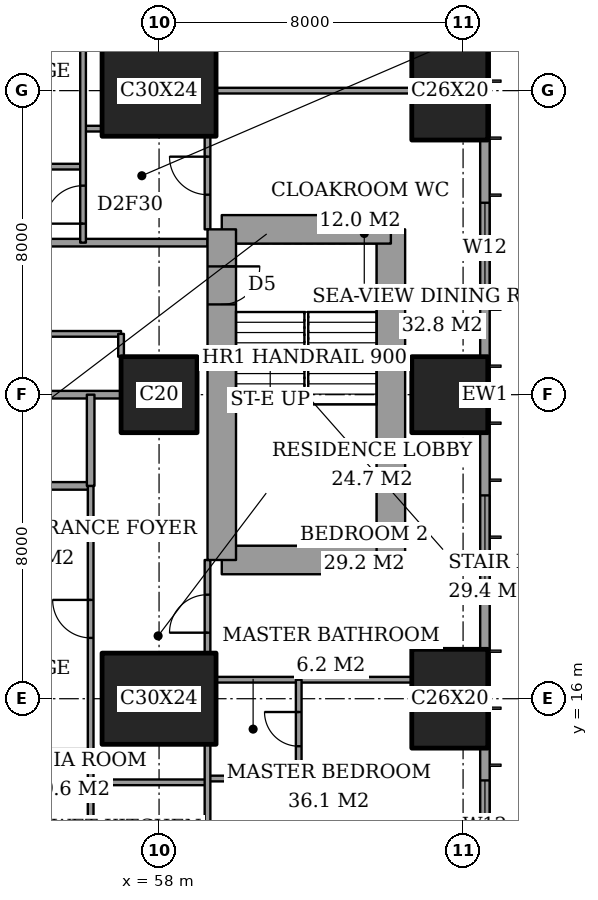
"""IFC4 building model, lengths in metres.
Left out: names, types, materials, properties, quantities, classifications, styles, units other than length and angle.
Written with IfcOpenShell. Run it as: python <this file> out.ifc"""

import sys

from ifc_helpers import new_model, si_unit, direction, frame, frame_2d, origin, origin_2d, place, context, subcontext, project, spatial, rectangle, extrude, element, fill, save


model = new_model("IFC4")
c1 = context("Model", 3, precision=1e-05, world=origin(), true_north=direction((0.0, 1.0)))
c2 = subcontext(c1, "Body", "Model", "MODEL_VIEW")
j1 = project(units=[si_unit("LENGTHUNIT", "METRE"), si_unit("PLANEANGLEUNIT", "RADIAN")], contexts=[c1])
p1 = place(None, origin())
s1 = spatial("IfcSite", under=j1, at=p1, CompositionType="ELEMENT")
p2 = place(p1, origin())
s2 = spatial("IfcBuilding", under=s1, at=p2, CompositionType="ELEMENT")
p3 = place(p2, frame((0.0, 0.0, 110.6)))
s3 = spatial("IfcBuildingStorey", under=s2, at=p3, CompositionType="ELEMENT", Elevation=110.6)
p4 = place(p3, frame((58.0, 16.0, 0.0), z_axis=(0.0, 0.0, 1.0), x_axis=(1.0, 0.0, 0.0)))
e1 = element("IfcColumn", 1, at=p4, inside=s3, PredefinedType="COLUMN", context=c2, shape_type="SweptSolid", body=[
    extrude(rectangle(XDim=3.0, YDim=2.4, at=origin_2d()), origin(), (0.0, 0.0, 1.0), 3.6),
])
p5 = place(p3, frame((58.0, 24.0, 0.0), z_axis=(0.0, 0.0, 1.0), x_axis=(1.0, 0.0, 0.0)))
e2 = element("IfcColumn", 2, at=p5, inside=s3, PredefinedType="COLUMN", context=c2, shape_type="SweptSolid", body=[
    extrude(rectangle(XDim=2.0, YDim=2.0, at=origin_2d()), origin(), (0.0, 0.0, 1.0), 3.6),
])
p6 = place(p3, frame((58.0, 32.0, 0.0), z_axis=(0.0, 0.0, 1.0), x_axis=(1.0, 0.0, 0.0)))
e3 = element("IfcColumn", 3, at=p6, inside=s3, PredefinedType="COLUMN", context=c2, shape_type="SweptSolid", body=[
    extrude(rectangle(XDim=3.0, YDim=2.4, at=origin_2d()), origin(), (0.0, 0.0, 1.0), 3.6),
])
p7 = place(p3, frame((65.65, 16.0, 0.0), z_axis=(0.0, 0.0, 1.0), x_axis=(0.0, 1.0, 0.0)))
e4 = element("IfcColumn", 4, at=p7, inside=s3, PredefinedType="COLUMN", context=c2, shape_type="SweptSolid", body=[
    extrude(rectangle(XDim=2.6, YDim=2.0, at=origin_2d()), origin(), (0.0, 0.0, 1.0), 3.6),
])
p8 = place(p3, frame((65.65, 24.0, 0.0), z_axis=(0.0, 0.0, 1.0), x_axis=(1.0, 0.0, 0.0)))
e5 = element("IfcColumn", 5, at=p8, inside=s3, PredefinedType="COLUMN", context=c2, shape_type="SweptSolid", body=[
    extrude(rectangle(XDim=2.0, YDim=2.0, at=origin_2d()), origin(), (0.0, 0.0, 1.0), 3.6),
])
p9 = place(p3, frame((65.65, 32.0, 0.0), z_axis=(0.0, 0.0, 1.0), x_axis=(0.0, 1.0, 0.0)))
e6 = element("IfcColumn", 6, at=p9, inside=s3, PredefinedType="COLUMN", context=c2, shape_type="SweptSolid", body=[
    extrude(rectangle(XDim=2.6, YDim=2.0, at=origin_2d()), origin(), (0.0, 0.0, 1.0), 3.6),
])
p10 = place(p3, frame((59.65, 19.65, 0.0), z_axis=(0.0, 0.0, 1.0), x_axis=(1.0, 0.0, 0.0)))
e7 = element("IfcWall", 7, at=p10, inside=s3, PredefinedType="SHEAR", context=c2, shape_type="SweptSolid", body=[
    extrude(rectangle(XDim=4.45, YDim=0.75, at=frame_2d((2.225, 0.0))), origin(), (0.0, 0.0, 1.0), 3.6),
])
p11 = place(p3, frame((64.1, 19.65, 0.0), z_axis=(0.0, 0.0, 1.0), x_axis=(0.0, 1.0, 0.0)))
e8 = element("IfcWall", 8, at=p11, inside=s3, PredefinedType="SHEAR", context=c2, shape_type="SweptSolid", body=[
    extrude(rectangle(XDim=8.7, YDim=0.75, at=frame_2d((4.35, 0.0))), origin(), (0.0, 0.0, 1.0), 3.6),
])
p12 = place(p3, frame((64.1, 28.35, 0.0), z_axis=(0.0, 0.0, 1.0), x_axis=(-1.0, 0.0, 0.0)))
e9 = element("IfcWall", 9, at=p12, inside=s3, PredefinedType="SHEAR", context=c2, shape_type="SweptSolid", body=[
    extrude(rectangle(XDim=4.45, YDim=0.75, at=frame_2d((2.225, 0.0))), origin(), (0.0, 0.0, 1.0), 3.6),
])
p13 = place(p3, frame((59.65, 28.35, 0.0), z_axis=(0.0, 0.0, 1.0), x_axis=(0.0, -1.0, 0.0)))
e10 = element("IfcWall", 10, at=p13, inside=s3, PredefinedType="SHEAR", context=c2, shape_type="SweptSolid", body=[
    extrude(rectangle(XDim=8.7, YDim=0.75, at=frame_2d((4.35, 0.0))), origin(), (0.0, 0.0, 1.0), 3.6),
])
p14 = place(p13, frame((0.975, 0.0, 0.0)))
e11 = element("IfcOpeningElement", 11, at=p14, cuts=e10, PredefinedType="OPENING", context=c2, shape_type="SweptSolid", body=[
    extrude(rectangle(XDim=1.0, YDim=2.1, at=frame_2d((0.5, 1.05))), frame((0.0, 0.385, 0.0), z_axis=(0.0, -1.0, 0.0), x_axis=(1.0, 0.0, 0.0)), (0.0, 0.0, 1.0), 0.77),
])
p15 = place(p3, frame((66.575, 3.175, 0.0), z_axis=(0.0, 0.0, 1.0), x_axis=(0.0, 1.0, 0.0)))
e12 = element("IfcWall", 12, at=p15, inside=s3, PredefinedType="SOLIDWALL", context=c2, shape_type="SweptSolid", body=[
    extrude(rectangle(XDim=41.65, YDim=0.25, at=frame_2d((20.825, 0.0))), origin(), (0.0, 0.0, 1.0), 3.6),
])
p16 = place(p15, frame((0.775, 0.0, 0.4)))
e13 = element("IfcOpeningElement", 13, at=p16, cuts=e12, PredefinedType="OPENING", context=c2, shape_type="SweptSolid", body=[
    extrude(rectangle(XDim=2.4, YDim=2.2, at=frame_2d((1.2, 1.1))), frame((0.0, 0.135, 0.0), z_axis=(0.0, -1.0, 0.0), x_axis=(1.0, 0.0, 0.0)), (0.0, 0.0, 1.0), 0.27),
])
p17 = place(p15, frame((6.1, 0.0, 0.4)))
e14 = element("IfcOpeningElement", 14, at=p17, cuts=e12, PredefinedType="OPENING", context=c2, shape_type="SweptSolid", body=[
    extrude(rectangle(XDim=1.2, YDim=2.2, at=frame_2d((0.6, 1.1))), frame((0.0, 0.135, 0.0), z_axis=(0.0, -1.0, 0.0), x_axis=(1.0, 0.0, 0.0)), (0.0, 0.0, 1.0), 0.27),
])
p18 = place(p15, frame((8.275, 0.0, 0.4)))
e15 = element("IfcOpeningElement", 15, at=p18, cuts=e12, PredefinedType="OPENING", context=c2, shape_type="SweptSolid", body=[
    extrude(rectangle(XDim=2.4, YDim=2.2, at=frame_2d((1.2, 1.1))), frame((0.0, 0.135, 0.0), z_axis=(0.0, -1.0, 0.0), x_axis=(1.0, 0.0, 0.0)), (0.0, 0.0, 1.0), 0.27),
])
p19 = place(p15, frame((15.775, 0.0, 0.4)))
e16 = element("IfcOpeningElement", 16, at=p19, cuts=e12, PredefinedType="OPENING", context=c2, shape_type="SweptSolid", body=[
    extrude(rectangle(XDim=2.4, YDim=2.2, at=frame_2d((1.2, 1.1))), frame((0.0, 0.135, 0.0), z_axis=(0.0, -1.0, 0.0), x_axis=(1.0, 0.0, 0.0)), (0.0, 0.0, 1.0), 0.27),
])
p20 = place(p15, frame((23.475, 0.0, 0.4)))
e17 = element("IfcOpeningElement", 17, at=p20, cuts=e12, PredefinedType="OPENING", context=c2, shape_type="SweptSolid", body=[
    extrude(rectangle(XDim=2.4, YDim=2.2, at=frame_2d((1.2, 1.1))), frame((0.0, 0.135, 0.0), z_axis=(0.0, -1.0, 0.0), x_axis=(1.0, 0.0, 0.0)), (0.0, 0.0, 1.0), 0.27),
])
p21 = place(p15, frame((30.975, 0.0, 0.4)))
e18 = element("IfcOpeningElement", 18, at=p21, cuts=e12, PredefinedType="OPENING", context=c2, shape_type="SweptSolid", body=[
    extrude(rectangle(XDim=2.4, YDim=2.2, at=frame_2d((1.2, 1.1))), frame((0.0, 0.135, 0.0), z_axis=(0.0, -1.0, 0.0), x_axis=(1.0, 0.0, 0.0)), (0.0, 0.0, 1.0), 0.27),
])
p22 = place(p15, frame((34.5, 0.0, 0.4)))
e19 = element("IfcOpeningElement", 19, at=p22, cuts=e12, PredefinedType="OPENING", context=c2, shape_type="SweptSolid", body=[
    extrude(rectangle(XDim=1.2, YDim=2.2, at=frame_2d((0.6, 1.1))), frame((0.0, 0.135, 0.0), z_axis=(0.0, -1.0, 0.0), x_axis=(1.0, 0.0, 0.0)), (0.0, 0.0, 1.0), 0.27),
])
p23 = place(p15, frame((38.475, 0.0, 0.4)))
e20 = element("IfcOpeningElement", 20, at=p23, cuts=e12, PredefinedType="OPENING", context=c2, shape_type="SweptSolid", body=[
    extrude(rectangle(XDim=2.4, YDim=2.2, at=frame_2d((1.2, 1.1))), frame((0.0, 0.135, 0.0), z_axis=(0.0, -1.0, 0.0), x_axis=(1.0, 0.0, 0.0)), (0.0, 0.0, 1.0), 0.27),
])
p24 = place(p3, frame((56.2, 13.8, 0.0), z_axis=(0.0, 0.0, 1.0), x_axis=(1.0, 0.0, 0.0)))
e21 = element("IfcWall", 21, at=p24, inside=s3, PredefinedType="PARTITIONING", context=c2, shape_type="SweptSolid", body=[
    extrude(rectangle(XDim=3.075, YDim=0.15, at=frame_2d((1.538, 0.0))), origin(), (0.0, 0.0, 1.0), 3.35),
])
p25 = place(p3, frame((59.275, 13.9, 0.0), z_axis=(0.0, 0.0, 1.0), x_axis=(1.0, 0.0, 0.0)))
e22 = element("IfcWall", 22, at=p25, inside=s3, PredefinedType="PARTITIONING", context=c2, shape_type="SweptSolid", body=[
    extrude(rectangle(XDim=2.4, YDim=0.15, at=frame_2d((1.2, 0.0))), origin(), (0.0, 0.0, 1.0), 3.35),
])
p26 = place(p3, frame((48.0, 14.6, 0.0), z_axis=(0.0, 0.0, 1.0), x_axis=(1.0, 0.0, 0.0)))
e23 = element("IfcWall", 23, at=p26, inside=s3, PredefinedType="PARTITIONING", context=c2, shape_type="SweptSolid", body=[
    extrude(rectangle(XDim=8.2, YDim=0.15, at=frame_2d((4.1, 0.0))), origin(), (0.0, 0.0, 1.0), 3.35),
])
p27 = place(p26, frame((4.2, 0.0, 0.0)))
e24 = element("IfcOpeningElement", 24, at=p27, cuts=e23, PredefinedType="OPENING", context=c2, shape_type="SweptSolid", body=[
    extrude(rectangle(XDim=1.0, YDim=2.1, at=frame_2d((0.5, 1.05))), frame((0.0, 0.085, 0.0), z_axis=(0.0, -1.0, 0.0), x_axis=(1.0, 0.0, 0.0)), (0.0, 0.0, 1.0), 0.17),
])
p28 = place(p3, frame((59.5, 16.5, 0.0), z_axis=(0.0, 0.0, 1.0), x_axis=(1.0, 0.0, 0.0)))
e25 = element("IfcWall", 25, at=p28, inside=s3, PredefinedType="PARTITIONING", context=c2, shape_type="SweptSolid", body=[
    extrude(rectangle(XDim=5.15, YDim=0.15, at=frame_2d((2.575, 0.0))), origin(), (0.0, 0.0, 1.0), 3.35),
])
p29 = place(p3, frame((51.2, 21.6, 0.0), z_axis=(0.0, 0.0, 1.0), x_axis=(1.0, 0.0, 0.0)))
e26 = element("IfcWall", 26, at=p29, inside=s3, PredefinedType="PARTITIONING", context=c2, shape_type="SweptSolid", body=[
    extrude(rectangle(XDim=5.0, YDim=0.2, at=frame_2d((2.5, 0.0))), origin(), (0.0, 0.0, 1.0), 3.35),
])
p30 = place(p29, frame((2.05, 0.0, 0.0)))
e27 = element("IfcOpeningElement", 27, at=p30, cuts=e26, PredefinedType="OPENING", context=c2, shape_type="SweptSolid", body=[
    extrude(rectangle(XDim=0.9, YDim=2.1, at=frame_2d((0.45, 1.05))), frame((0.0, 0.11, 0.0), z_axis=(0.0, -1.0, 0.0), x_axis=(1.0, 0.0, 0.0)), (0.0, 0.0, 1.0), 0.22),
])
p31 = place(p3, frame((51.0, 24.0, 0.0), z_axis=(0.0, 0.0, 1.0), x_axis=(1.0, 0.0, 0.0)))
e28 = element("IfcWall", 28, at=p31, inside=s3, PredefinedType="PARTITIONING", context=c2, shape_type="SweptSolid", body=[
    extrude(rectangle(XDim=6.0, YDim=0.2, at=frame_2d((3.0, 0.0))), origin(), (0.0, 0.0, 1.0), 3.35),
])
p32 = place(p3, frame((48.6, 25.6, 0.0), z_axis=(0.0, 0.0, 1.0), x_axis=(1.0, 0.0, 0.0)))
e29 = element("IfcWall", 29, at=p32, inside=s3, PredefinedType="PARTITIONING", context=c2, shape_type="SweptSolid", body=[
    extrude(rectangle(XDim=8.4, YDim=0.15, at=frame_2d((4.2, 0.0))), origin(), (0.0, 0.0, 1.0), 3.35),
])
p33 = place(p32, frame((3.75, 0.0, 0.0)))
e30 = element("IfcOpeningElement", 30, at=p33, cuts=e29, PredefinedType="OPENING", context=c2, shape_type="SweptSolid", body=[
    extrude(rectangle(XDim=0.9, YDim=2.1, at=frame_2d((0.45, 1.05))), frame((0.0, 0.085, 0.0), z_axis=(0.0, -1.0, 0.0), x_axis=(1.0, 0.0, 0.0)), (0.0, 0.0, 1.0), 0.17),
])
p34 = place(p3, frame((42.0, 28.0, 0.0), z_axis=(0.0, 0.0, 1.0), x_axis=(1.0, 0.0, 0.0)))
e31 = element("IfcWall", 31, at=p34, inside=s3, PredefinedType="PARTITIONING", context=c2, shape_type="SweptSolid", body=[
    extrude(rectangle(XDim=17.275, YDim=0.2, at=frame_2d((8.637, 0.0))), origin(), (0.0, 0.0, 1.0), 3.35),
])
p35 = place(p34, frame((9.4, 0.0, 0.0)))
e32 = element("IfcOpeningElement", 32, at=p35, cuts=e31, PredefinedType="OPENING", context=c2, shape_type="SweptSolid", body=[
    extrude(rectangle(XDim=1.2, YDim=2.4, at=frame_2d((0.6, 1.2))), frame((0.0, 0.11, 0.0), z_axis=(0.0, -1.0, 0.0), x_axis=(1.0, 0.0, 0.0)), (0.0, 0.0, 1.0), 0.22),
])
p36 = place(p3, frame((51.6, 30.0, 0.0), z_axis=(0.0, 0.0, 1.0), x_axis=(1.0, 0.0, 0.0)))
e33 = element("IfcWall", 33, at=p36, inside=s3, PredefinedType="PARTITIONING", context=c2, shape_type="SweptSolid", body=[
    extrude(rectangle(XDim=4.4, YDim=0.15, at=frame_2d((2.2, 0.0))), origin(), (0.0, 0.0, 1.0), 3.35),
])
p37 = place(p36, frame((0.6, 0.0, 0.0)))
e34 = element("IfcOpeningElement", 34, at=p37, cuts=e33, PredefinedType="OPENING", context=c2, shape_type="SweptSolid", body=[
    extrude(rectangle(XDim=1.0, YDim=2.1, at=frame_2d((0.5, 1.05))), frame((0.0, 0.085, 0.0), z_axis=(0.0, -1.0, 0.0), x_axis=(1.0, 0.0, 0.0)), (0.0, 0.0, 1.0), 0.17),
])
p38 = place(p3, frame((56.0, 31.0, 0.0), z_axis=(0.0, 0.0, 1.0), x_axis=(1.0, 0.0, 0.0)))
e35 = element("IfcWall", 35, at=p38, inside=s3, PredefinedType="PARTITIONING", context=c2, shape_type="SweptSolid", body=[
    extrude(rectangle(XDim=0.5, YDim=0.15, at=frame_2d((0.25, 0.0))), origin(), (0.0, 0.0, 1.0), 3.35),
])
p39 = place(p3, frame((59.5, 32.0, 0.0), z_axis=(0.0, 0.0, 1.0), x_axis=(1.0, 0.0, 0.0)))
e36 = element("IfcWall", 36, at=p39, inside=s3, PredefinedType="PARTITIONING", context=c2, shape_type="SweptSolid", body=[
    extrude(rectangle(XDim=5.15, YDim=0.15, at=frame_2d((2.575, 0.0))), origin(), (0.0, 0.0, 1.0), 2.634),
])
p40 = place(p3, frame((56.0, 28.0, 0.0), z_axis=(0.0, 0.0, 1.0), x_axis=(0.0, 1.0, 0.0)))
e37 = element("IfcWall", 37, at=p40, inside=s3, PredefinedType="PARTITIONING", context=c2, shape_type="SweptSolid", body=[
    extrude(rectangle(XDim=9.4, YDim=0.15, at=frame_2d((4.7, 0.0))), origin(), (0.0, 0.0, 1.0), 3.35),
])
p41 = place(p40, frame((0.5, 0.0, 0.0)))
e38 = element("IfcOpeningElement", 38, at=p41, cuts=e37, PredefinedType="OPENING", context=c2, shape_type="SweptSolid", body=[
    extrude(rectangle(XDim=1.0, YDim=2.1, at=frame_2d((0.5, 1.05))), frame((0.0, 0.085, 0.0), z_axis=(0.0, -1.0, 0.0), x_axis=(1.0, 0.0, 0.0)), (0.0, 0.0, 1.0), 0.17),
])
p42 = place(p3, frame((56.2, 21.6, 0.0), z_axis=(0.0, 0.0, 1.0), x_axis=(0.0, 1.0, 0.0)))
e39 = element("IfcWall", 39, at=p42, inside=s3, PredefinedType="PARTITIONING", context=c2, shape_type="SweptSolid", body=[
    extrude(rectangle(XDim=2.4, YDim=0.2, at=frame_2d((1.2, 0.0))), origin(), (0.0, 0.0, 1.0), 3.35),
])
p43 = place(p3, frame((56.2, 10.6, 0.0), z_axis=(0.0, 0.0, 1.0), x_axis=(0.0, 1.0, 0.0)))
e40 = element("IfcWall", 40, at=p43, inside=s3, PredefinedType="PARTITIONING", context=c2, shape_type="SweptSolid", body=[
    extrude(rectangle(XDim=11.0, YDim=0.15, at=frame_2d((5.5, 0.0))), origin(), (0.0, 0.0, 1.0), 3.35),
])
p44 = place(p43, frame((7.0, 0.0, 0.0)))
e41 = element("IfcOpeningElement", 41, at=p44, cuts=e40, PredefinedType="OPENING", context=c2, shape_type="SweptSolid", body=[
    extrude(rectangle(XDim=1.0, YDim=2.1, at=frame_2d((0.5, 1.05))), frame((0.0, 0.085, 0.0), z_axis=(0.0, -1.0, 0.0), x_axis=(1.0, 0.0, 0.0)), (0.0, 0.0, 1.0), 0.17),
])
p45 = place(p3, frame((57.0, 25.0, 0.0), z_axis=(0.0, 0.0, 1.0), x_axis=(0.0, 1.0, 0.0)))
e42 = element("IfcWall", 42, at=p45, inside=s3, PredefinedType="PARTITIONING", context=c2, shape_type="SweptSolid", body=[
    extrude(rectangle(XDim=0.6, YDim=0.15, at=frame_2d((0.3, 0.0))), origin(), (0.0, 0.0, 1.0), 3.35),
])
p46 = place(p3, frame((59.275, 10.6, 0.0), z_axis=(0.0, 0.0, 1.0), x_axis=(0.0, 1.0, 0.0)))
e43 = element("IfcWall", 43, at=p46, inside=s3, PredefinedType="PARTITIONING", context=c2, shape_type="SweptSolid", body=[
    extrude(rectangle(XDim=4.2, YDim=0.15, at=frame_2d((2.1, 0.0))), origin(), (0.0, 0.0, 1.0), 3.35),
])
p47 = place(p3, frame((59.275, 17.2, 0.0), z_axis=(0.0, 0.0, 1.0), x_axis=(0.0, 1.0, 0.0)))
e44 = element("IfcWall", 44, at=p47, inside=s3, PredefinedType="PARTITIONING", context=c2, shape_type="SweptSolid", body=[
    extrude(rectangle(XDim=2.45, YDim=0.15, at=frame_2d((1.225, 0.0))), origin(), (0.0, 0.0, 1.0), 3.35),
])
p48 = place(p47, frame((0.538, 0.0, 0.0)))
e45 = element("IfcOpeningElement", 45, at=p48, cuts=e44, PredefinedType="OPENING", context=c2, shape_type="SweptSolid", body=[
    extrude(rectangle(XDim=1.0, YDim=2.1, at=frame_2d((0.5, 1.05))), frame((0.0, 0.085, 0.0), z_axis=(0.0, -1.0, 0.0), x_axis=(1.0, 0.0, 0.0)), (0.0, 0.0, 1.0), 0.17),
])
p49 = place(p3, frame((59.275, 28.35, 0.0), z_axis=(0.0, 0.0, 1.0), x_axis=(0.0, 1.0, 0.0)))
e46 = element("IfcWall", 46, at=p49, inside=s3, PredefinedType="PARTITIONING", context=c2, shape_type="SweptSolid", body=[
    extrude(rectangle(XDim=2.45, YDim=0.15, at=frame_2d((1.225, 0.0))), origin(), (0.0, 0.0, 1.0), 3.35),
])
p50 = place(p49, frame((0.913, 0.0, 0.0)))
e47 = element("IfcOpeningElement", 47, at=p50, cuts=e46, PredefinedType="OPENING", context=c2, shape_type="SweptSolid", body=[
    extrude(rectangle(XDim=1.0, YDim=2.1, at=frame_2d((0.5, 1.05))), frame((0.0, 0.085, 0.0), z_axis=(0.0, -1.0, 0.0), x_axis=(1.0, 0.0, 0.0)), (0.0, 0.0, 1.0), 0.17),
])
p51 = place(p3, frame((61.675, 13.9, 0.0), z_axis=(0.0, 0.0, 1.0), x_axis=(0.0, 1.0, 0.0)))
e48 = element("IfcWall", 48, at=p51, inside=s3, PredefinedType="PARTITIONING", context=c2, shape_type="SweptSolid", body=[
    extrude(rectangle(XDim=2.6, YDim=0.15, at=frame_2d((1.3, 0.0))), origin(), (0.0, 0.0, 1.0), 3.35),
])
p52 = place(p51, frame((0.85, 0.0, 0.0)))
e49 = element("IfcOpeningElement", 49, at=p52, cuts=e48, PredefinedType="OPENING", context=c2, shape_type="SweptSolid", body=[
    extrude(rectangle(XDim=0.9, YDim=2.1, at=frame_2d((0.45, 1.05))), frame((0.0, 0.085, 0.0), z_axis=(0.0, -1.0, 0.0), x_axis=(1.0, 0.0, 0.0)), (0.0, 0.0, 1.0), 0.17),
])
p53 = place(p18, origin())
e50 = element("IfcWindow", 50, at=p53, inside=s3, PartitioningType="SINGLE_PANEL", PredefinedType="WINDOW", context=c2, shape_type="SweptSolid", body=[
    extrude(rectangle(XDim=2.4, YDim=2.2, at=frame_2d((1.2, 1.1))), frame((0.0, 0.03, 0.0), z_axis=(0.0, -1.0, 0.0), x_axis=(1.0, 0.0, 0.0)), (0.0, 0.0, 1.0), 0.06),
])
fill(e15, e50)
p54 = place(p19, origin())
e51 = element("IfcWindow", 51, at=p54, inside=s3, PartitioningType="SINGLE_PANEL", PredefinedType="WINDOW", context=c2, shape_type="SweptSolid", body=[
    extrude(rectangle(XDim=2.4, YDim=2.2, at=frame_2d((1.2, 1.1))), frame((0.0, 0.03, 0.0), z_axis=(0.0, -1.0, 0.0), x_axis=(1.0, 0.0, 0.0)), (0.0, 0.0, 1.0), 0.06),
])
fill(e16, e51)
p55 = place(p20, origin())
e52 = element("IfcWindow", 52, at=p55, inside=s3, PartitioningType="SINGLE_PANEL", PredefinedType="WINDOW", context=c2, shape_type="SweptSolid", body=[
    extrude(rectangle(XDim=2.4, YDim=2.2, at=frame_2d((1.2, 1.1))), frame((0.0, 0.03, 0.0), z_axis=(0.0, -1.0, 0.0), x_axis=(1.0, 0.0, 0.0)), (0.0, 0.0, 1.0), 0.06),
])
fill(e17, e52)
p56 = place(p52, origin())
e53 = element("IfcDoor", 53, at=p56, inside=s3, OperationType="SINGLE_SWING_LEFT", PredefinedType="DOOR", context=c2, shape_type="SweptSolid", body=[
    extrude(rectangle(XDim=0.9, YDim=2.1, at=frame_2d((0.45, 1.05))), frame((0.0, 0.025, 0.0), z_axis=(0.0, -1.0, 0.0), x_axis=(1.0, 0.0, 0.0)), (0.0, 0.0, 1.0), 0.05),
])
fill(e49, e53)
p57 = place(p48, origin())
e54 = element("IfcDoor", 54, at=p57, inside=s3, OperationType="SINGLE_SWING_RIGHT", PredefinedType="DOOR", context=c2, shape_type="SweptSolid", body=[
    extrude(rectangle(XDim=1.0, YDim=2.1, at=frame_2d((0.5, 1.05))), frame((0.0, 0.025, 0.0), z_axis=(0.0, -1.0, 0.0), x_axis=(1.0, 0.0, 0.0)), (0.0, 0.0, 1.0), 0.05),
])
fill(e45, e54)
p58 = place(p44, origin())
e55 = element("IfcDoor", 55, at=p58, inside=s3, OperationType="SINGLE_SWING_LEFT", PredefinedType="DOOR", context=c2, shape_type="SweptSolid", body=[
    extrude(rectangle(XDim=1.0, YDim=2.1, at=frame_2d((0.5, 1.05))), frame((0.0, 0.025, 0.0), z_axis=(0.0, -1.0, 0.0), x_axis=(1.0, 0.0, 0.0)), (0.0, 0.0, 1.0), 0.05),
])
fill(e41, e55)
p59 = place(p50, origin())
e56 = element("IfcDoor", 56, at=p59, inside=s3, OperationType="SINGLE_SWING_LEFT", PredefinedType="DOOR", context=c2, shape_type="SweptSolid", body=[
    extrude(rectangle(XDim=1.0, YDim=2.1, at=frame_2d((0.5, 1.05))), frame((0.0, 0.025, 0.0), z_axis=(0.0, -1.0, 0.0), x_axis=(1.0, 0.0, 0.0)), (0.0, 0.0, 1.0), 0.05),
])
fill(e47, e56)
p60 = place(p41, origin())
e57 = element("IfcDoor", 57, at=p60, inside=s3, OperationType="SINGLE_SWING_RIGHT", PredefinedType="DOOR", context=c2, shape_type="SweptSolid", body=[
    extrude(rectangle(XDim=1.0, YDim=2.1, at=frame_2d((0.5, 1.05))), frame((0.0, 0.025, 0.0), z_axis=(0.0, -1.0, 0.0), x_axis=(1.0, 0.0, 0.0)), (0.0, 0.0, 1.0), 0.05),
])
fill(e38, e57)
p61 = place(p14, origin())
e58 = element("IfcDoor", 58, at=p61, inside=s3, OperationType="SINGLE_SWING_RIGHT", PredefinedType="DOOR", context=c2, shape_type="SweptSolid", body=[
    extrude(rectangle(XDim=1.0, YDim=2.1, at=frame_2d((0.5, 1.05))), frame((0.0, 0.025, 0.0), z_axis=(0.0, -1.0, 0.0), x_axis=(1.0, 0.0, 0.0)), (0.0, 0.0, 1.0), 0.05),
])
fill(e11, e58)
save(model, sys.argv[1])
